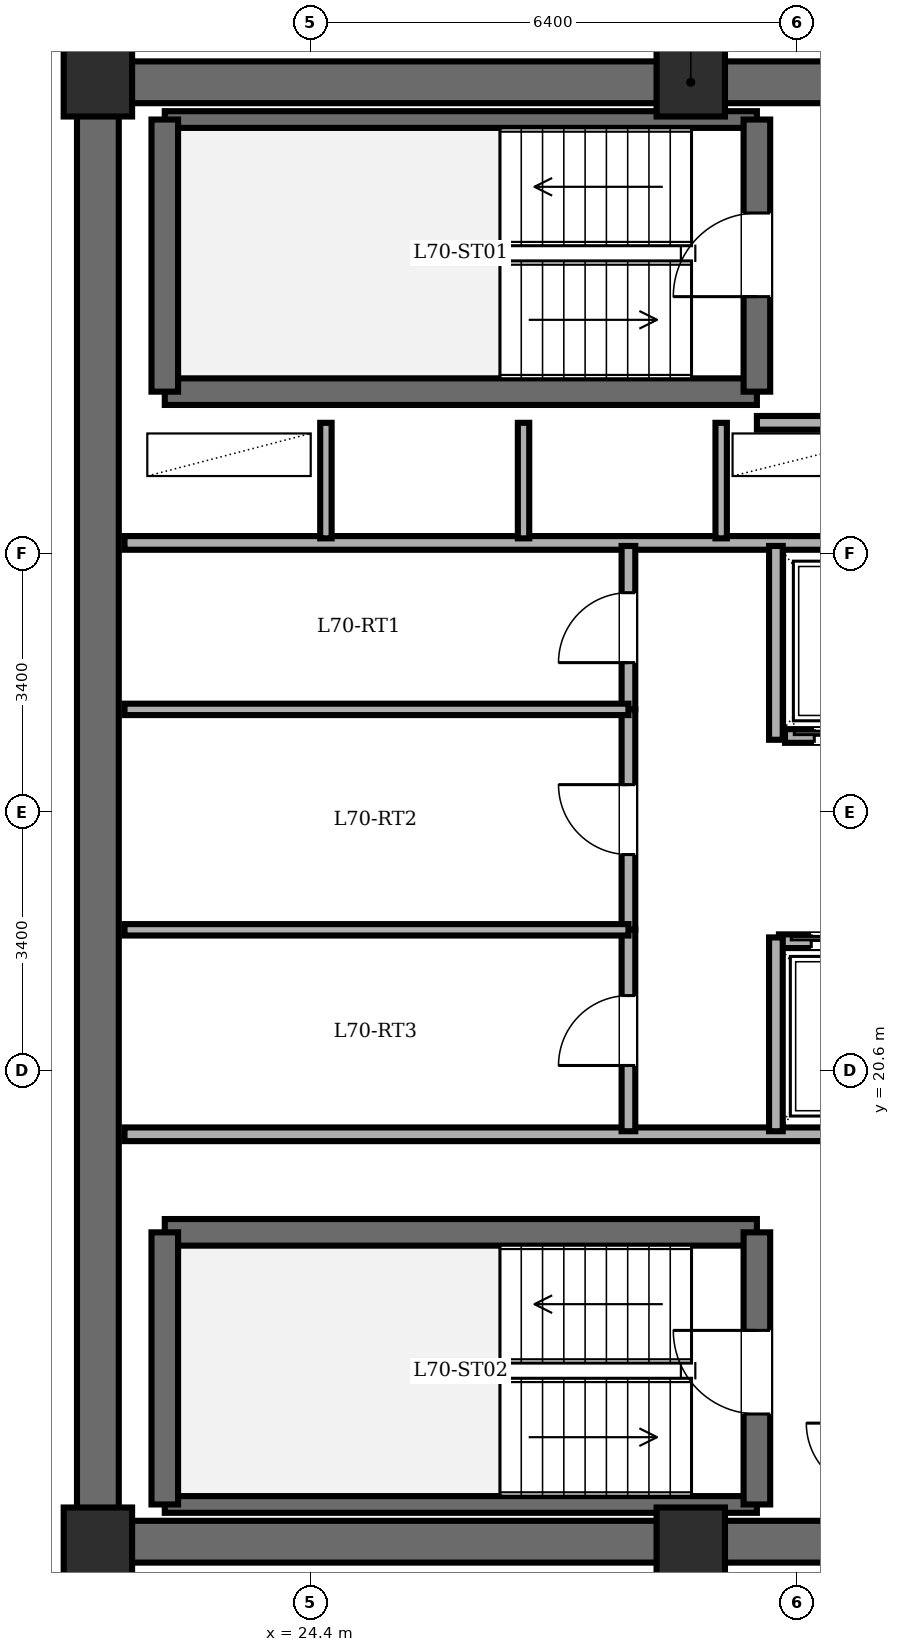
"""IFC4 building model, lengths in metres.
Left out: names, types, materials, properties, quantities, classifications, styles, units other than length and angle.
Written with IfcOpenShell. Run it as: python <this file> out.ifc"""

import sys

from ifc_helpers import new_model, si_unit, direction, frame, frame_2d, origin, origin_2d, place, context, subcontext, project, spatial, rectangle, extrude, element, fill, save


model = new_model("IFC4")
c1 = context("Model", 3, precision=1e-05, world=origin(), true_north=direction((0.0, 1.0)))
c2 = subcontext(c1, "Body", "Model", "MODEL_VIEW")
j1 = project(units=[si_unit("LENGTHUNIT", "METRE"), si_unit("PLANEANGLEUNIT", "RADIAN")], contexts=[c1])
p1 = place(None, origin())
s1 = spatial("IfcSite", under=j1, at=p1, CompositionType="ELEMENT")
p2 = place(p1, origin())
s2 = spatial("IfcBuilding", under=s1, at=p2, CompositionType="ELEMENT")
p3 = place(p2, frame((0.0, 0.0, 269.75)))
s3 = spatial("IfcBuildingStorey", under=s2, at=p3, CompositionType="ELEMENT", Elevation=269.75)
for number, where, z_axis, x_axis in (
    (1, (21.6, 14.4, 0.0), (0.0, 0.0, 1.0), (1.0, 0.0, 0.0)),
    (2, (29.4, 14.4, 0.0), (0.0, 0.0, 1.0), (1.0, 0.0, 0.0)),
    (3, (29.4, 33.6, 0.0), (0.0, 0.0, 1.0), (1.0, 0.0, 0.0)),
    (4, (21.6, 33.6, 0.0), (0.0, 0.0, 1.0), (1.0, 0.0, 0.0)),
):
    element("IfcColumn", number, at=place(p3, frame(where, z_axis=z_axis, x_axis=x_axis)), inside=s3, PredefinedType="COLUMN", context=c2, shape_type="SweptSolid", body=[
        extrude(rectangle(XDim=0.9, YDim=0.9, at=origin_2d()), origin(), (0.0, 0.0, 1.0), 3.65),
    ])
p4 = place(p3, frame((21.6, 14.4, 0.0), z_axis=(0.0, 0.0, 1.0), x_axis=(0.0, 1.0, 0.0)))
e5 = element("IfcWall", 5, at=p4, inside=s3, PredefinedType="SHEAR", context=c2, shape_type="SweptSolid", body=[
    extrude(rectangle(XDim=19.2, YDim=0.55, at=frame_2d((9.6, 0.0))), origin(), (0.0, 0.0, 1.0), 3.45),
])
for number, where, z_axis, x_axis in (
    (6, (21.6, 33.6, 0.0), (0.0, 0.0, 1.0), (1.0, 0.0, 0.0)),
    (7, (37.2, 14.4, 0.0), (0.0, 0.0, 1.0), (-1.0, 0.0, 0.0)),
):
    element("IfcWall", number, at=place(p3, frame(where, z_axis=z_axis, x_axis=x_axis)), inside=s3, PredefinedType="SHEAR", context=c2, shape_type="SweptSolid", body=[
        extrude(rectangle(XDim=15.6, YDim=0.55, at=frame_2d((7.8, 0.0))), origin(), (0.0, 0.0, 1.0), 3.45),
    ])
p5 = place(p3, frame((22.48, 29.53, 0.0), z_axis=(0.0, 0.0, 1.0), x_axis=(1.0, 0.0, 0.0)))
e8 = element("IfcWall", 8, at=p5, inside=s3, PredefinedType="SOLIDWALL", context=c2, shape_type="SweptSolid", body=[
    extrude(rectangle(XDim=7.79, YDim=0.35, at=frame_2d((3.895, 0.0))), origin(), (0.0, 0.0, 1.0), 3.45),
])
p6 = place(p3, frame((22.48, 33.11, 0.0), z_axis=(0.0, 0.0, 1.0), x_axis=(1.0, 0.0, 0.0)))
e9 = element("IfcWall", 9, at=p6, inside=s3, PredefinedType="PARTITIONING", context=c2, shape_type="SweptSolid", body=[
    extrude(rectangle(XDim=7.79, YDim=0.22, at=frame_2d((3.895, 0.0))), origin(), (0.0, 0.0, 1.0), 3.45),
])
p7 = place(p3, frame((22.48, 29.53, 0.0), z_axis=(0.0, 0.0, 1.0), x_axis=(0.0, 1.0, 0.0)))
e10 = element("IfcWall", 10, at=p7, inside=s3, PredefinedType="SOLIDWALL", context=c2, shape_type="SweptSolid", body=[
    extrude(rectangle(XDim=3.58, YDim=0.35, at=frame_2d((1.79, 0.0))), origin(), (0.0, 0.0, 1.0), 3.45),
])
p8 = place(p3, frame((30.27, 29.53, 0.0), z_axis=(0.0, 0.0, 1.0), x_axis=(0.0, 1.0, 0.0)))
e11 = element("IfcWall", 11, at=p8, inside=s3, PredefinedType="SOLIDWALL", context=c2, shape_type="SweptSolid", body=[
    extrude(rectangle(XDim=3.58, YDim=0.35, at=frame_2d((1.79, 0.0))), origin(), (0.0, 0.0, 1.0), 3.45),
])
p9 = place(p8, frame((1.25, 0.0, 0.0)))
e12 = element("IfcOpeningElement", 12, at=p9, cuts=e11, PredefinedType="OPENING", context=c2, shape_type="SweptSolid", body=[
    extrude(rectangle(XDim=1.1, YDim=2.15, at=frame_2d((0.55, 1.075))), frame((0.0, 0.185, 0.0), z_axis=(0.0, -1.0, 0.0), x_axis=(1.0, 0.0, 0.0)), (0.0, 0.0, 1.0), 0.37),
])
p10 = place(p3, frame((22.48, 18.47, 0.0), z_axis=(0.0, 0.0, 1.0), x_axis=(1.0, 0.0, 0.0)))
e13 = element("IfcWall", 13, at=p10, inside=s3, PredefinedType="SOLIDWALL", context=c2, shape_type="SweptSolid", body=[
    extrude(rectangle(XDim=7.79, YDim=0.35, at=frame_2d((3.895, 0.0))), origin(), (0.0, 0.0, 1.0), 3.45),
])
p11 = place(p3, frame((22.48, 14.89, 0.0), z_axis=(0.0, 0.0, 1.0), x_axis=(1.0, 0.0, 0.0)))
e14 = element("IfcWall", 14, at=p11, inside=s3, PredefinedType="PARTITIONING", context=c2, shape_type="SweptSolid", body=[
    extrude(rectangle(XDim=7.79, YDim=0.22, at=frame_2d((3.895, 0.0))), origin(), (0.0, 0.0, 1.0), 3.45),
])
p12 = place(p3, frame((22.48, 14.89, 0.0), z_axis=(0.0, 0.0, 1.0), x_axis=(0.0, 1.0, 0.0)))
e15 = element("IfcWall", 15, at=p12, inside=s3, PredefinedType="SOLIDWALL", context=c2, shape_type="SweptSolid", body=[
    extrude(rectangle(XDim=3.58, YDim=0.35, at=frame_2d((1.79, 0.0))), origin(), (0.0, 0.0, 1.0), 3.45),
])
p13 = place(p3, frame((30.27, 14.89, 0.0), z_axis=(0.0, 0.0, 1.0), x_axis=(0.0, 1.0, 0.0)))
e16 = element("IfcWall", 16, at=p13, inside=s3, PredefinedType="SOLIDWALL", context=c2, shape_type="SweptSolid", body=[
    extrude(rectangle(XDim=3.58, YDim=0.35, at=frame_2d((1.79, 0.0))), origin(), (0.0, 0.0, 1.0), 3.45),
])
p14 = place(p13, frame((1.19, 0.0, 0.0)))
e17 = element("IfcOpeningElement", 17, at=p14, cuts=e16, PredefinedType="OPENING", context=c2, shape_type="SweptSolid", body=[
    extrude(rectangle(XDim=1.1, YDim=2.15, at=frame_2d((0.55, 1.075))), frame((0.0, 0.185, 0.0), z_axis=(0.0, -1.0, 0.0), x_axis=(1.0, 0.0, 0.0)), (0.0, 0.0, 1.0), 0.37),
])
p15 = place(p3, frame((30.27, 29.12, 0.0), z_axis=(0.0, 0.0, 1.0), x_axis=(1.0, 0.0, 0.0)))
e18 = element("IfcWall", 18, at=p15, inside=s3, PredefinedType="PARTITIONING", context=c2, shape_type="SweptSolid", body=[
    extrude(rectangle(XDim=2.24, YDim=0.18, at=frame_2d((1.12, 0.0))), origin(), (0.0, 0.0, 1.0), 3.45),
])
p16 = place(p3, frame((21.95, 27.54, 0.0), z_axis=(0.0, 0.0, 1.0), x_axis=(1.0, 0.0, 0.0)))
e19 = element("IfcWall", 19, at=p16, inside=s3, PredefinedType="PARTITIONING", context=c2, shape_type="SweptSolid", body=[
    extrude(rectangle(XDim=10.56, YDim=0.18, at=frame_2d((5.28, 0.0))), origin(), (0.0, 0.0, 1.0), 3.45),
])
for number, where, z_axis, x_axis in (
    (20, (24.6, 27.6, 0.0), (0.0, 0.0, 1.0), (0.0, 1.0, 0.0)),
    (21, (27.2, 27.6, 0.0), (0.0, 0.0, 1.0), (0.0, 1.0, 0.0)),
    (22, (29.8, 27.6, 0.0), (0.0, 0.0, 1.0), (0.0, 1.0, 0.0)),
):
    element("IfcWall", number, at=place(p3, frame(where, z_axis=z_axis, x_axis=x_axis)), inside=s3, PredefinedType="PARTITIONING", context=c2, shape_type="SweptSolid", body=[
        extrude(rectangle(XDim=1.52, YDim=0.15, at=frame_2d((0.76, 0.0))), origin(), (0.0, 0.0, 1.0), 3.45),
    ])
p17 = place(p3, frame((21.95, 19.76, 0.0), z_axis=(0.0, 0.0, 1.0), x_axis=(1.0, 0.0, 0.0)))
e23 = element("IfcWall", 23, at=p17, inside=s3, PredefinedType="PARTITIONING", context=c2, shape_type="SweptSolid", body=[
    extrude(rectangle(XDim=14.87, YDim=0.18, at=frame_2d((7.435, 0.0))), origin(), (0.0, 0.0, 1.0), 3.45),
])
p18 = place(p3, frame((32.46, 25.0, 0.0), z_axis=(0.0, 0.0, 1.0), x_axis=(-1.0, 0.0, 0.0)))
e24 = element("IfcWall", 24, at=p18, inside=s3, PredefinedType="PARTITIONING", context=c2, shape_type="SweptSolid", body=[
    extrude(rectangle(XDim=1.82, YDim=0.18, at=frame_2d((0.91, 0.0))), origin(), (0.0, 0.0, 1.0), 3.45),
])
p19 = place(p18, frame((0.385, 0.0, 0.0)))
e25 = element("IfcOpeningElement", 25, at=p19, cuts=e24, PredefinedType="OPENING", context=c2, shape_type="SweptSolid", body=[
    extrude(rectangle(XDim=1.05, YDim=2.2, at=frame_2d((0.525, 1.1))), frame((0.0, 0.1, 0.0), z_axis=(0.0, -1.0, 0.0), x_axis=(1.0, 0.0, 0.0)), (0.0, 0.0, 1.0), 0.2),
])
p20 = place(p3, frame((30.56, 22.3, 0.0), z_axis=(0.0, 0.0, 1.0), x_axis=(1.0, 0.0, 0.0)))
e26 = element("IfcWall", 26, at=p20, inside=s3, PredefinedType="PARTITIONING", context=c2, shape_type="SweptSolid", body=[
    extrude(rectangle(XDim=1.9, YDim=0.18, at=frame_2d((0.95, 0.0))), origin(), (0.0, 0.0, 1.0), 3.45),
])
p21 = place(p20, frame((0.425, 0.0, 0.0)))
e27 = element("IfcOpeningElement", 27, at=p21, cuts=e26, PredefinedType="OPENING", context=c2, shape_type="SweptSolid", body=[
    extrude(rectangle(XDim=1.05, YDim=2.2, at=frame_2d((0.525, 1.1))), frame((0.0, 0.1, 0.0), z_axis=(0.0, -1.0, 0.0), x_axis=(1.0, 0.0, 0.0)), (0.0, 0.0, 1.0), 0.2),
])
for number, where, z_axis, x_axis in (
    (28, (30.52, 24.95, 0.0), (0.0, 0.0, 1.0), (0.0, 1.0, 0.0)),
    (29, (30.52, 19.8, 0.0), (0.0, 0.0, 1.0), (0.0, 1.0, 0.0)),
):
    element("IfcWall", number, at=place(p3, frame(where, z_axis=z_axis, x_axis=x_axis)), inside=s3, PredefinedType="PARTITIONING", context=c2, shape_type="SweptSolid", body=[
        extrude(rectangle(XDim=2.55, YDim=0.18, at=frame_2d((1.275, 0.0))), origin(), (0.0, 0.0, 1.0), 3.45),
    ])
p22 = place(p3, frame((28.58, 25.35, 0.0), z_axis=(0.0, 0.0, 1.0), x_axis=(0.0, 1.0, 0.0)))
e30 = element("IfcWall", 30, at=p22, inside=s3, PredefinedType="PARTITIONING", context=c2, shape_type="SweptSolid", body=[
    extrude(rectangle(XDim=2.15, YDim=0.18, at=frame_2d((1.075, 0.0))), origin(), (0.0, 0.0, 1.0), 3.45),
])
p23 = place(p22, frame((0.615, 0.0, 0.0)))
e31 = element("IfcOpeningElement", 31, at=p23, cuts=e30, PredefinedType="OPENING", context=c2, shape_type="SweptSolid", body=[
    extrude(rectangle(XDim=0.92, YDim=2.1, at=frame_2d((0.46, 1.05))), frame((0.0, 0.1, 0.0), z_axis=(0.0, -1.0, 0.0), x_axis=(1.0, 0.0, 0.0)), (0.0, 0.0, 1.0), 0.2),
])
p24 = place(p3, frame((28.58, 22.45, 0.0), z_axis=(0.0, 0.0, 1.0), x_axis=(0.0, 1.0, 0.0)))
e32 = element("IfcWall", 32, at=p24, inside=s3, PredefinedType="PARTITIONING", context=c2, shape_type="SweptSolid", body=[
    extrude(rectangle(XDim=2.9, YDim=0.18, at=frame_2d((1.45, 0.0))), origin(), (0.0, 0.0, 1.0), 3.45),
])
p25 = place(p24, frame((0.99, 0.0, 0.0)))
e33 = element("IfcOpeningElement", 33, at=p25, cuts=e32, PredefinedType="OPENING", context=c2, shape_type="SweptSolid", body=[
    extrude(rectangle(XDim=0.92, YDim=2.1, at=frame_2d((0.46, 1.05))), frame((0.0, 0.1, 0.0), z_axis=(0.0, -1.0, 0.0), x_axis=(1.0, 0.0, 0.0)), (0.0, 0.0, 1.0), 0.2),
])
p26 = place(p3, frame((28.58, 19.8, 0.0), z_axis=(0.0, 0.0, 1.0), x_axis=(0.0, 1.0, 0.0)))
e34 = element("IfcWall", 34, at=p26, inside=s3, PredefinedType="PARTITIONING", context=c2, shape_type="SweptSolid", body=[
    extrude(rectangle(XDim=2.65, YDim=0.18, at=frame_2d((1.325, 0.0))), origin(), (0.0, 0.0, 1.0), 3.45),
])
p27 = place(p26, frame((0.865, 0.0, 0.0)))
e35 = element("IfcOpeningElement", 35, at=p27, cuts=e34, PredefinedType="OPENING", context=c2, shape_type="SweptSolid", body=[
    extrude(rectangle(XDim=0.92, YDim=2.1, at=frame_2d((0.46, 1.05))), frame((0.0, 0.1, 0.0), z_axis=(0.0, -1.0, 0.0), x_axis=(1.0, 0.0, 0.0)), (0.0, 0.0, 1.0), 0.2),
])
for number, where, z_axis, x_axis in (
    (36, (21.95, 25.35, 0.0), (0.0, 0.0, 1.0), (1.0, 0.0, 0.0)),
    (37, (21.95, 22.45, 0.0), (0.0, 0.0, 1.0), (1.0, 0.0, 0.0)),
):
    element("IfcWall", number, at=place(p3, frame(where, z_axis=z_axis, x_axis=x_axis)), inside=s3, PredefinedType="PARTITIONING", context=c2, shape_type="SweptSolid", body=[
        extrude(rectangle(XDim=6.63, YDim=0.15, at=frame_2d((3.315, 0.0))), origin(), (0.0, 0.0, 1.0), 3.45),
    ])
p28 = place(p9, origin())
e38 = element("IfcDoor", 38, at=p28, inside=s3, OperationType="SINGLE_SWING_LEFT", PredefinedType="DOOR", context=c2, shape_type="SweptSolid", body=[
    extrude(rectangle(XDim=1.1, YDim=2.15, at=frame_2d((0.55, 1.075))), frame((0.0, 0.025, 0.0), z_axis=(0.0, -1.0, 0.0), x_axis=(1.0, 0.0, 0.0)), (0.0, 0.0, 1.0), 0.05),
])
fill(e12, e38)
p29 = place(p14, origin())
e39 = element("IfcDoor", 39, at=p29, inside=s3, OperationType="SINGLE_SWING_RIGHT", PredefinedType="DOOR", context=c2, shape_type="SweptSolid", body=[
    extrude(rectangle(XDim=1.1, YDim=2.15, at=frame_2d((0.55, 1.075))), frame((0.0, 0.025, 0.0), z_axis=(0.0, -1.0, 0.0), x_axis=(1.0, 0.0, 0.0)), (0.0, 0.0, 1.0), 0.05),
])
fill(e17, e39)
p30 = place(p19, origin())
e40 = element("IfcDoor", 40, at=p30, inside=s3, OperationType="DOUBLE_DOOR_SLIDING", PredefinedType="DOOR", context=c2, shape_type="SweptSolid", body=[
    extrude(rectangle(XDim=1.05, YDim=2.2, at=frame_2d((0.525, 1.1))), frame((0.0, 0.025, 0.0), z_axis=(0.0, -1.0, 0.0), x_axis=(1.0, 0.0, 0.0)), (0.0, 0.0, 1.0), 0.05),
])
fill(e25, e40)
p31 = place(p21, origin())
e41 = element("IfcDoor", 41, at=p31, inside=s3, OperationType="DOUBLE_DOOR_SLIDING", PredefinedType="DOOR", context=c2, shape_type="SweptSolid", body=[
    extrude(rectangle(XDim=1.05, YDim=2.2, at=frame_2d((0.525, 1.1))), frame((0.0, 0.025, 0.0), z_axis=(0.0, -1.0, 0.0), x_axis=(1.0, 0.0, 0.0)), (0.0, 0.0, 1.0), 0.05),
])
fill(e27, e41)
p32 = place(p23, origin())
e42 = element("IfcDoor", 42, at=p32, inside=s3, OperationType="SINGLE_SWING_LEFT", PredefinedType="DOOR", context=c2, shape_type="SweptSolid", body=[
    extrude(rectangle(XDim=0.92, YDim=2.1, at=frame_2d((0.46, 1.05))), frame((0.0, 0.025, 0.0), z_axis=(0.0, -1.0, 0.0), x_axis=(1.0, 0.0, 0.0)), (0.0, 0.0, 1.0), 0.05),
])
fill(e31, e42)
p33 = place(p25, origin())
e43 = element("IfcDoor", 43, at=p33, inside=s3, OperationType="SINGLE_SWING_RIGHT", PredefinedType="DOOR", context=c2, shape_type="SweptSolid", body=[
    extrude(rectangle(XDim=0.92, YDim=2.1, at=frame_2d((0.46, 1.05))), frame((0.0, 0.025, 0.0), z_axis=(0.0, -1.0, 0.0), x_axis=(1.0, 0.0, 0.0)), (0.0, 0.0, 1.0), 0.05),
])
fill(e33, e43)
p34 = place(p27, origin())
e44 = element("IfcDoor", 44, at=p34, inside=s3, OperationType="SINGLE_SWING_LEFT", PredefinedType="DOOR", context=c2, shape_type="SweptSolid", body=[
    extrude(rectangle(XDim=0.92, YDim=2.1, at=frame_2d((0.46, 1.05))), frame((0.0, 0.025, 0.0), z_axis=(0.0, -1.0, 0.0), x_axis=(1.0, 0.0, 0.0)), (0.0, 0.0, 1.0), 0.05),
])
fill(e35, e44)
save(model, sys.argv[1])
